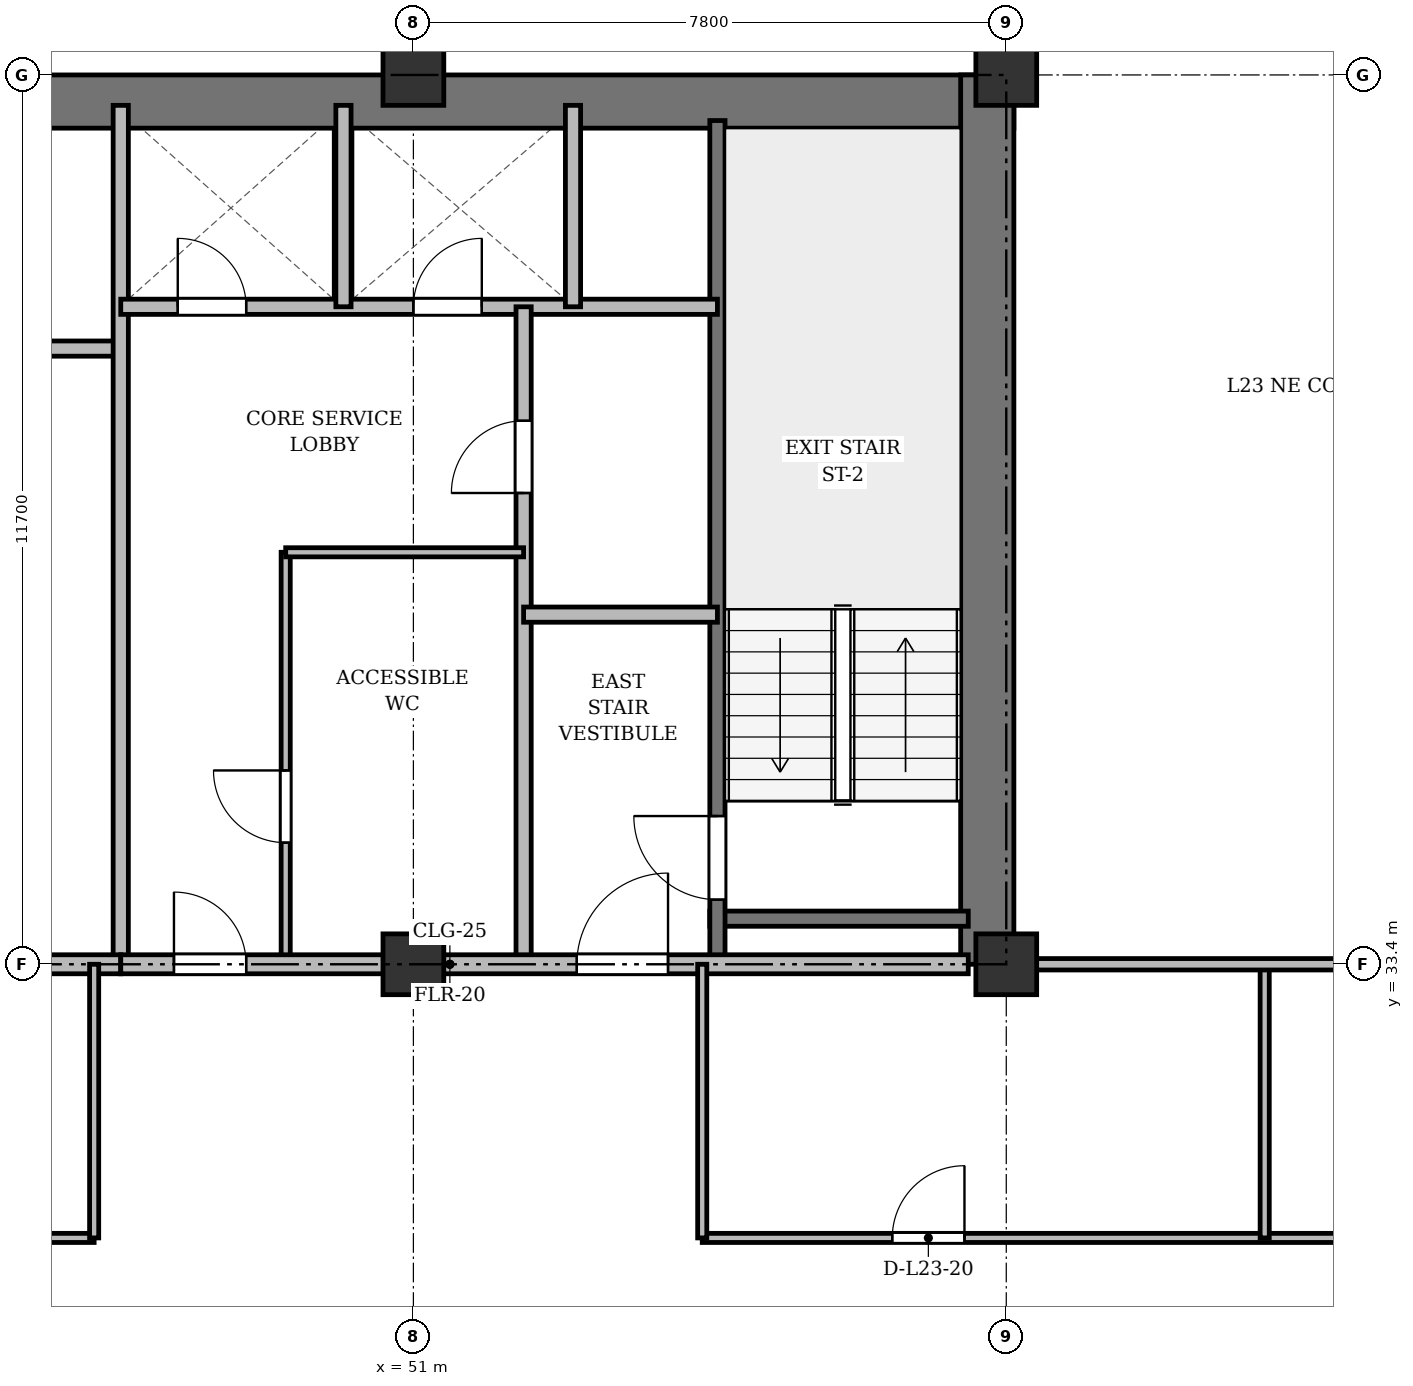
"""IFC4 building model, lengths in metres.
Left out: names, types, materials, properties, quantities, classifications, styles, units other than length and angle.
Written with IfcOpenShell. Run it as: python <this file> out.ifc"""

import sys

from ifc_helpers import new_model, si_unit, direction, frame, frame_2d, origin, origin_2d, place, context, subcontext, project, spatial, rectangle, extrude, source, transform, mapped, element, fill, save


model = new_model("IFC4")
c1 = context("Model", 3, precision=1e-05, world=origin(), true_north=direction((0.0, 1.0)))
c2 = subcontext(c1, "Body", "Model", "MODEL_VIEW")
j1 = project(units=[si_unit("LENGTHUNIT", "METRE"), si_unit("PLANEANGLEUNIT", "RADIAN")], contexts=[c1])
p1 = place(None, origin())
s1 = spatial("IfcSite", under=j1, at=p1, CompositionType="ELEMENT")
p2 = place(p1, origin())
s2 = spatial("IfcBuilding", under=s1, at=p2, CompositionType="ELEMENT")
p3 = place(p2, frame((0.0, 0.0, 92.5)))
s3 = spatial("IfcBuildingStorey", under=s2, at=p3, CompositionType="ELEMENT", Elevation=92.5)
m1 = source(origin(), c2, "Body", "SweptSolid", [
    extrude(rectangle(XDim=0.8, YDim=0.8, at=origin_2d()), origin(), (0.0, 0.0, 1.0), 3.6),
])
for number, where, z_axis, x_axis in (
    (1, (51.0, 33.4, 0.0), (0.0, 0.0, 1.0), (1.0, 0.0, 0.0)),
    (2, (51.0, 45.1, 0.0), (0.0, 0.0, 1.0), (1.0, 0.0, 0.0)),
    (3, (58.8, 33.4, 0.0), (0.0, 0.0, 1.0), (1.0, 0.0, 0.0)),
    (4, (58.8, 45.1, 0.0), (0.0, 0.0, 1.0), (1.0, 0.0, 0.0)),
):
    element("IfcColumn", number, at=place(p3, frame(where, z_axis=z_axis, x_axis=x_axis)), inside=s3, PredefinedType="COLUMN", context=c2, shape_type="MappedRepresentation", body=[
        mapped(m1, transform((0.0, 0.0, 0.0), x_axis=(1.0, 0.0, 0.0), y_axis=(0.0, 1.0, 0.0), z_axis=(0.0, 0.0, 1.0), scale=1.0)),
    ])
p4 = place(p3, frame((15.5, 44.75, 0.0), z_axis=(0.0, 0.0, 1.0), x_axis=(1.0, 0.0, 0.0)))
e5 = element("IfcWall", 5, at=p4, inside=s3, PredefinedType="SHEAR", context=c2, shape_type="SweptSolid", body=[
    extrude(rectangle(XDim=43.4, YDim=0.7, at=frame_2d((21.7, 0.0))), origin(), (0.0, 0.0, 1.0), 3.34),
])
p5 = place(p3, frame((58.55, 33.4, 0.0), z_axis=(0.0, 0.0, 1.0), x_axis=(0.0, 1.0, 0.0)))
e6 = element("IfcWall", 6, at=p5, inside=s3, PredefinedType="SHEAR", context=c2, shape_type="SweptSolid", body=[
    extrude(rectangle(XDim=11.7, YDim=0.7, at=frame_2d((5.85, 0.0))), origin(), (0.0, 0.0, 1.0), 3.34),
])
p6 = place(p3, frame((54.9, 34.0, 0.0), z_axis=(0.0, 0.0, 1.0), x_axis=(1.0, 0.0, 0.0)))
e7 = element("IfcWall", 7, at=p6, inside=s3, PredefinedType="SHEAR", context=c2, shape_type="SweptSolid", body=[
    extrude(rectangle(XDim=3.4, YDim=0.2, at=frame_2d((1.7, 0.0))), origin(), (0.0, 0.0, 1.0), 3.34),
])
p7 = place(p3, frame((55.0, 33.4, 0.0), z_axis=(0.0, 0.0, 1.0), x_axis=(0.0, 1.0, 0.0)))
e8 = element("IfcWall", 8, at=p7, inside=s3, PredefinedType="SHEAR", context=c2, shape_type="SweptSolid", body=[
    extrude(rectangle(XDim=11.1, YDim=0.2, at=frame_2d((5.55, 0.0))), origin(), (0.0, 0.0, 1.0), 3.34),
])
p8 = place(p7, frame((0.85, 0.0, 0.0)))
e9 = element("IfcOpeningElement", 9, at=p8, cuts=e8, PredefinedType="OPENING", context=c2, shape_type="SweptSolid", body=[
    extrude(rectangle(XDim=1.1, YDim=2.15, at=frame_2d((0.55, 1.075))), frame((0.0, 0.11, 0.0), z_axis=(0.0, -1.0, 0.0), x_axis=(1.0, 0.0, 0.0)), (0.0, 0.0, 1.0), 0.22),
])
p9 = place(p3, frame((40.25, 41.5, 0.0), z_axis=(0.0, 0.0, 1.0), x_axis=(1.0, 0.0, 0.0)))
e10 = element("IfcWall", 10, at=p9, inside=s3, PredefinedType="SOLIDWALL", context=c2, shape_type="SweptSolid", body=[
    extrude(rectangle(XDim=6.9, YDim=0.2, at=frame_2d((3.45, 0.0))), origin(), (0.0, 0.0, 1.0), 2.84),
])
p10 = place(p3, frame((47.15, 33.4, 0.0), z_axis=(0.0, 0.0, 1.0), x_axis=(0.0, 1.0, 0.0)))
e11 = element("IfcWall", 11, at=p10, inside=s3, PredefinedType="SOLIDWALL", context=c2, shape_type="SweptSolid", body=[
    extrude(rectangle(XDim=11.3, YDim=0.2, at=frame_2d((5.65, 0.0))), origin(), (0.0, 0.0, 1.0), 2.752),
])
p11 = place(p3, frame((26.3, 33.4, 0.0), z_axis=(0.0, 0.0, 1.0), x_axis=(1.0, 0.0, 0.0)))
e12 = element("IfcWall", 12, at=p11, inside=s3, PredefinedType="PARTITIONING", context=c2, shape_type="SweptSolid", body=[
    extrude(rectangle(XDim=20.85, YDim=0.25, at=frame_2d((10.425, 0.0))), origin(), (0.0, 0.0, 1.0), 2.752),
])
p12 = place(p11, frame((9.2, 0.0, 0.0)))
e13 = element("IfcOpeningElement", 13, at=p12, cuts=e12, PredefinedType="OPENING", context=c2, shape_type="SweptSolid", body=[
    extrude(rectangle(XDim=1.6, YDim=2.2, at=frame_2d((0.8, 1.1))), frame((0.0, 0.135, 0.0), z_axis=(0.0, -1.0, 0.0), x_axis=(1.0, 0.0, 0.0)), (0.0, 0.0, 1.0), 0.27),
])
p13 = place(p3, frame((47.15, 42.05, 0.0), z_axis=(0.0, 0.0, 1.0), x_axis=(1.0, 0.0, 0.0)))
e14 = element("IfcWall", 14, at=p13, inside=s3, PredefinedType="SOLIDWALL", context=c2, shape_type="SweptSolid", body=[
    extrude(rectangle(XDim=7.85, YDim=0.2, at=frame_2d((3.925, 0.0))), origin(), (0.0, 0.0, 1.0), 2.84),
])
p14 = place(p13, frame((0.75, 0.0, 0.0)))
e15 = element("IfcOpeningElement", 15, at=p14, cuts=e14, PredefinedType="OPENING", context=c2, shape_type="SweptSolid", body=[
    extrude(rectangle(XDim=0.9, YDim=2.1, at=frame_2d((0.45, 1.05))), frame((0.0, 0.11, 0.0), z_axis=(0.0, -1.0, 0.0), x_axis=(1.0, 0.0, 0.0)), (0.0, 0.0, 1.0), 0.22),
])
p15 = place(p13, frame((3.85, 0.0, 0.0)))
e16 = element("IfcOpeningElement", 16, at=p15, cuts=e14, PredefinedType="OPENING", context=c2, shape_type="SweptSolid", body=[
    extrude(rectangle(XDim=0.9, YDim=2.1, at=frame_2d((0.45, 1.05))), frame((0.0, 0.11, 0.0), z_axis=(0.0, -1.0, 0.0), x_axis=(1.0, 0.0, 0.0)), (0.0, 0.0, 1.0), 0.22),
])
for number, where, z_axis, x_axis in (
    (17, (50.08, 42.05, 0.0), (0.0, 0.0, 1.0), (0.0, 1.0, 0.0)),
    (18, (53.1, 42.05, 0.0), (0.0, 0.0, 1.0), (0.0, 1.0, 0.0)),
):
    element("IfcWall", number, at=place(p3, frame(where, z_axis=z_axis, x_axis=x_axis)), inside=s3, PredefinedType="SOLIDWALL", context=c2, shape_type="SweptSolid", body=[
        extrude(rectangle(XDim=2.65, YDim=0.2, at=frame_2d((1.325, 0.0))), origin(), (0.0, 0.0, 1.0), 3.34),
    ])
p16 = place(p3, frame((52.45, 33.4, 0.0), z_axis=(0.0, 0.0, 1.0), x_axis=(0.0, 1.0, 0.0)))
e19 = element("IfcWall", 19, at=p16, inside=s3, PredefinedType="PARTITIONING", context=c2, shape_type="SweptSolid", body=[
    extrude(rectangle(XDim=8.65, YDim=0.2, at=frame_2d((4.325, 0.0))), origin(), (0.0, 0.0, 1.0), 2.752),
])
p17 = place(p16, frame((6.2, 0.0, 0.0)))
e20 = element("IfcOpeningElement", 20, at=p17, cuts=e19, PredefinedType="OPENING", context=c2, shape_type="SweptSolid", body=[
    extrude(rectangle(XDim=0.95, YDim=2.15, at=frame_2d((0.475, 1.075))), frame((0.0, 0.11, 0.0), z_axis=(0.0, -1.0, 0.0), x_axis=(1.0, 0.0, 0.0)), (0.0, 0.0, 1.0), 0.22),
])
p18 = place(p3, frame((52.45, 38.0, 0.0), z_axis=(0.0, 0.0, 1.0), x_axis=(1.0, 0.0, 0.0)))
e21 = element("IfcWall", 21, at=p18, inside=s3, PredefinedType="PARTITIONING", context=c2, shape_type="SweptSolid", body=[
    extrude(rectangle(XDim=2.55, YDim=0.2, at=frame_2d((1.275, 0.0))), origin(), (0.0, 0.0, 1.0), 3.34),
])
p19 = place(p3, frame((49.32, 33.4, 0.0), z_axis=(0.0, 0.0, 1.0), x_axis=(0.0, 1.0, 0.0)))
e22 = element("IfcWall", 22, at=p19, inside=s3, PredefinedType="PARTITIONING", context=c2, shape_type="SweptSolid", body=[
    extrude(rectangle(XDim=5.42, YDim=0.12, at=frame_2d((2.71, 0.0))), origin(), (0.0, 0.0, 1.0), 2.752),
])
p20 = place(p19, frame((1.6, 0.0, 0.0)))
e23 = element("IfcOpeningElement", 23, at=p20, cuts=e22, PredefinedType="OPENING", context=c2, shape_type="SweptSolid", body=[
    extrude(rectangle(XDim=0.95, YDim=2.15, at=frame_2d((0.475, 1.075))), frame((0.0, 0.07, 0.0), z_axis=(0.0, -1.0, 0.0), x_axis=(1.0, 0.0, 0.0)), (0.0, 0.0, 1.0), 0.14),
])
p21 = place(p3, frame((49.32, 38.82, 0.0), z_axis=(0.0, 0.0, 1.0), x_axis=(1.0, 0.0, 0.0)))
e24 = element("IfcWall", 24, at=p21, inside=s3, PredefinedType="PARTITIONING", context=c2, shape_type="SweptSolid", body=[
    extrude(rectangle(XDim=3.13, YDim=0.12, at=frame_2d((1.565, 0.0))), origin(), (0.0, 0.0, 1.0), 2.84),
])
p22 = place(p3, frame((47.15, 33.4, 0.0), z_axis=(0.0, 0.0, 1.0), x_axis=(1.0, 0.0, 0.0)))
e25 = element("IfcWall", 25, at=p22, inside=s3, PredefinedType="PARTITIONING", context=c2, shape_type="SweptSolid", body=[
    extrude(rectangle(XDim=11.15, YDim=0.25, at=frame_2d((5.575, 0.0))), origin(), (0.0, 0.0, 1.0), 2.752),
])
p23 = place(p22, frame((0.7, 0.0, 0.0)))
e26 = element("IfcOpeningElement", 26, at=p23, cuts=e25, PredefinedType="OPENING", context=c2, shape_type="SweptSolid", body=[
    extrude(rectangle(XDim=0.95, YDim=2.15, at=frame_2d((0.475, 1.075))), frame((0.0, 0.135, 0.0), z_axis=(0.0, -1.0, 0.0), x_axis=(1.0, 0.0, 0.0)), (0.0, 0.0, 1.0), 0.27),
])
p24 = place(p22, frame((6.0, 0.0, 0.0)))
e27 = element("IfcOpeningElement", 27, at=p24, cuts=e25, PredefinedType="OPENING", context=c2, shape_type="SweptSolid", body=[
    extrude(rectangle(XDim=1.2, YDim=2.15, at=frame_2d((0.6, 1.075))), frame((0.0, 0.135, 0.0), z_axis=(0.0, -1.0, 0.0), x_axis=(1.0, 0.0, 0.0)), (0.0, 0.0, 1.0), 0.27),
])
p25 = place(p3, frame((38.2, 29.8, 0.0), z_axis=(0.0, 0.0, 1.0), x_axis=(1.0, 0.0, 0.0)))
e28 = element("IfcWall", 28, at=p25, inside=s3, PredefinedType="PARTITIONING", context=c2, shape_type="SweptSolid", body=[
    extrude(rectangle(XDim=8.6, YDim=0.12, at=frame_2d((4.3, 0.0))), origin(), (0.0, 0.0, 1.0), 2.84),
])
p26 = place(p25, frame((3.462, 0.0, 0.0)))
e29 = element("IfcOpeningElement", 29, at=p26, cuts=e28, PredefinedType="OPENING", context=c2, shape_type="SweptSolid", body=[
    extrude(rectangle(XDim=0.95, YDim=2.15, at=frame_2d((0.475, 1.075))), frame((0.0, 0.07, 0.0), z_axis=(0.0, -1.0, 0.0), x_axis=(1.0, 0.0, 0.0)), (0.0, 0.0, 1.0), 0.14),
])
p27 = place(p3, frame((54.8, 29.8, 0.0), z_axis=(0.0, 0.0, 1.0), x_axis=(1.0, 0.0, 0.0)))
e30 = element("IfcWall", 30, at=p27, inside=s3, PredefinedType="PARTITIONING", context=c2, shape_type="SweptSolid", body=[
    extrude(rectangle(XDim=14.85, YDim=0.12, at=frame_2d((7.425, 0.0))), origin(), (0.0, 0.0, 1.0), 2.84),
])
p28 = place(p27, frame((2.5, 0.0, 0.0)))
e31 = element("IfcOpeningElement", 31, at=p28, cuts=e30, PredefinedType="OPENING", context=c2, shape_type="SweptSolid", body=[
    extrude(rectangle(XDim=0.95, YDim=2.15, at=frame_2d((0.475, 1.075))), frame((0.0, 0.07, 0.0), z_axis=(0.0, -1.0, 0.0), x_axis=(1.0, 0.0, 0.0)), (0.0, 0.0, 1.0), 0.14),
])
p29 = place(p27, frame((9.2, 0.0, 0.0)))
e32 = element("IfcOpeningElement", 32, at=p29, cuts=e30, PredefinedType="OPENING", context=c2, shape_type="SweptSolid", body=[
    extrude(rectangle(XDim=0.95, YDim=2.15, at=frame_2d((0.475, 1.075))), frame((0.0, 0.07, 0.0), z_axis=(0.0, -1.0, 0.0), x_axis=(1.0, 0.0, 0.0)), (0.0, 0.0, 1.0), 0.14),
])
for number, where, z_axis, x_axis in (
    (33, (62.2, 29.8, 0.0), (0.0, 0.0, 1.0), (0.0, 1.0, 0.0)),
    (34, (46.8, 29.8, 0.0), (0.0, 0.0, 1.0), (0.0, 1.0, 0.0)),
    (35, (54.8, 29.8, 0.0), (0.0, 0.0, 1.0), (0.0, 1.0, 0.0)),
):
    element("IfcWall", number, at=place(p3, frame(where, z_axis=z_axis, x_axis=x_axis)), inside=s3, PredefinedType="PARTITIONING", context=c2, shape_type="SweptSolid", body=[
        extrude(rectangle(XDim=3.6, YDim=0.12, at=frame_2d((1.8, 0.0))), origin(), (0.0, 0.0, 1.0), 2.752),
    ])
p30 = place(p3, frame((58.8, 33.4, 0.0), z_axis=(0.0, 0.0, 1.0), x_axis=(1.0, 0.0, 0.0)))
e36 = element("IfcWall", 36, at=p30, inside=s3, PredefinedType="PARTITIONING", context=c2, shape_type="SweptSolid", body=[
    extrude(rectangle(XDim=10.85, YDim=0.15, at=frame_2d((5.425, 0.0))), origin(), (0.0, 0.0, 1.0), 2.752),
])
p31 = place(p30, frame((4.76, 0.0, 0.0)))
e37 = element("IfcOpeningElement", 37, at=p31, cuts=e36, PredefinedType="OPENING", context=c2, shape_type="SweptSolid", body=[
    extrude(rectangle(XDim=0.95, YDim=2.15, at=frame_2d((0.475, 1.075))), frame((0.0, 0.085, 0.0), z_axis=(0.0, -1.0, 0.0), x_axis=(1.0, 0.0, 0.0)), (0.0, 0.0, 1.0), 0.17),
])
p32 = place(p3, frame((58.8, 44.75, 0.0), z_axis=(0.0, 0.0, 1.0), x_axis=(0.0, 1.0, 0.0)))
e38 = element("IfcWall", 38, at=p32, inside=s3, PredefinedType="PARTITIONING", context=c2, shape_type="SweptSolid", body=[
    extrude(rectangle(XDim=3.61, YDim=0.15, at=frame_2d((1.805, 0.0))), origin(), (0.0, 0.0, 1.0), 2.84),
])
p33 = place(p32, frame((1.1, 0.0, 0.0)))
e39 = element("IfcOpeningElement", 39, at=p33, cuts=e38, PredefinedType="OPENING", context=c2, shape_type="SweptSolid", body=[
    extrude(rectangle(XDim=0.95, YDim=2.15, at=frame_2d((0.475, 1.075))), frame((0.0, 0.085, 0.0), z_axis=(0.0, -1.0, 0.0), x_axis=(1.0, 0.0, 0.0)), (0.0, 0.0, 1.0), 0.17),
])
m2 = source(origin(), c2, "Body", "SweptSolid", [
    extrude(rectangle(XDim=1.1, YDim=2.15, at=frame_2d((0.55, 1.075))), frame((0.0, 0.025, 0.0), z_axis=(0.0, -1.0, 0.0), x_axis=(1.0, 0.0, 0.0)), (0.0, 0.0, 1.0), 0.05),
])
p34 = place(p8, origin())
e40 = element("IfcDoor", 40, at=p34, inside=s3, OperationType="SINGLE_SWING_RIGHT", PredefinedType="DOOR", context=c2, shape_type="MappedRepresentation", body=[
    mapped(m2, transform((0.0, 0.0, 0.0), x_axis=(1.0, 0.0, 0.0), y_axis=(0.0, 1.0, 0.0), z_axis=(0.0, 0.0, 1.0), scale=1.0)),
])
fill(e9, e40)
m3 = source(origin(), c2, "Body", "SweptSolid", [
    extrude(rectangle(XDim=0.9, YDim=2.1, at=frame_2d((0.45, 1.05))), frame((0.0, 0.025, 0.0), z_axis=(0.0, -1.0, 0.0), x_axis=(1.0, 0.0, 0.0)), (0.0, 0.0, 1.0), 0.05),
])
p35 = place(p14, origin())
e41 = element("IfcDoor", 41, at=p35, inside=s3, OperationType="SINGLE_SWING_LEFT", PredefinedType="DOOR", context=c2, shape_type="MappedRepresentation", body=[
    mapped(m3, transform((0.0, 0.0, 0.0), x_axis=(1.0, 0.0, 0.0), y_axis=(0.0, 1.0, 0.0), z_axis=(0.0, 0.0, 1.0), scale=1.0)),
])
fill(e15, e41)
p36 = place(p15, origin())
e42 = element("IfcDoor", 42, at=p36, inside=s3, OperationType="SINGLE_SWING_RIGHT", PredefinedType="DOOR", context=c2, shape_type="MappedRepresentation", body=[
    mapped(m3, transform((0.0, 0.0, 0.0), x_axis=(1.0, 0.0, 0.0), y_axis=(0.0, 1.0, 0.0), z_axis=(0.0, 0.0, 1.0), scale=1.0)),
])
fill(e16, e42)
m4 = source(origin(), c2, "Body", "SweptSolid", [
    extrude(rectangle(XDim=0.95, YDim=2.15, at=frame_2d((0.475, 1.075))), frame((0.0, 0.025, 0.0), z_axis=(0.0, -1.0, 0.0), x_axis=(1.0, 0.0, 0.0)), (0.0, 0.0, 1.0), 0.05),
])
p37 = place(p17, origin())
e43 = element("IfcDoor", 43, at=p37, inside=s3, OperationType="SINGLE_SWING_LEFT", PredefinedType="DOOR", context=c2, shape_type="MappedRepresentation", body=[
    mapped(m4, transform((0.0, 0.0, 0.0), x_axis=(1.0, 0.0, 0.0), y_axis=(0.0, 1.0, 0.0), z_axis=(0.0, 0.0, 1.0), scale=1.0)),
])
fill(e20, e43)
p38 = place(p20, origin())
e44 = element("IfcDoor", 44, at=p38, inside=s3, OperationType="SINGLE_SWING_RIGHT", PredefinedType="DOOR", context=c2, shape_type="MappedRepresentation", body=[
    mapped(m4, transform((0.0, 0.0, 0.0), x_axis=(1.0, 0.0, 0.0), y_axis=(0.0, 1.0, 0.0), z_axis=(0.0, 0.0, 1.0), scale=1.0)),
])
fill(e23, e44)
p39 = place(p23, origin())
e45 = element("IfcDoor", 45, at=p39, inside=s3, OperationType="SINGLE_SWING_LEFT", PredefinedType="DOOR", context=c2, shape_type="MappedRepresentation", body=[
    mapped(m4, transform((0.0, 0.0, 0.0), x_axis=(1.0, 0.0, 0.0), y_axis=(0.0, 1.0, 0.0), z_axis=(0.0, 0.0, 1.0), scale=1.0)),
])
fill(e26, e45)
m5 = source(origin(), c2, "Body", "SweptSolid", [
    extrude(rectangle(XDim=1.2, YDim=2.15, at=frame_2d((0.6, 1.075))), frame((0.0, 0.025, 0.0), z_axis=(0.0, -1.0, 0.0), x_axis=(1.0, 0.0, 0.0)), (0.0, 0.0, 1.0), 0.05),
])
p40 = place(p24, origin())
e46 = element("IfcDoor", 46, at=p40, inside=s3, OperationType="SINGLE_SWING_RIGHT", PredefinedType="DOOR", context=c2, shape_type="MappedRepresentation", body=[
    mapped(m5, transform((0.0, 0.0, 0.0), x_axis=(1.0, 0.0, 0.0), y_axis=(0.0, 1.0, 0.0), z_axis=(0.0, 0.0, 1.0), scale=1.0)),
])
fill(e27, e46)
p41 = place(p28, origin())
e47 = element("IfcDoor", 47, at=p41, inside=s3, OperationType="SINGLE_SWING_RIGHT", PredefinedType="DOOR", context=c2, shape_type="MappedRepresentation", body=[
    mapped(m4, transform((0.0, 0.0, 0.0), x_axis=(1.0, 0.0, 0.0), y_axis=(0.0, 1.0, 0.0), z_axis=(0.0, 0.0, 1.0), scale=1.0)),
])
fill(e31, e47)
save(model, sys.argv[1])
